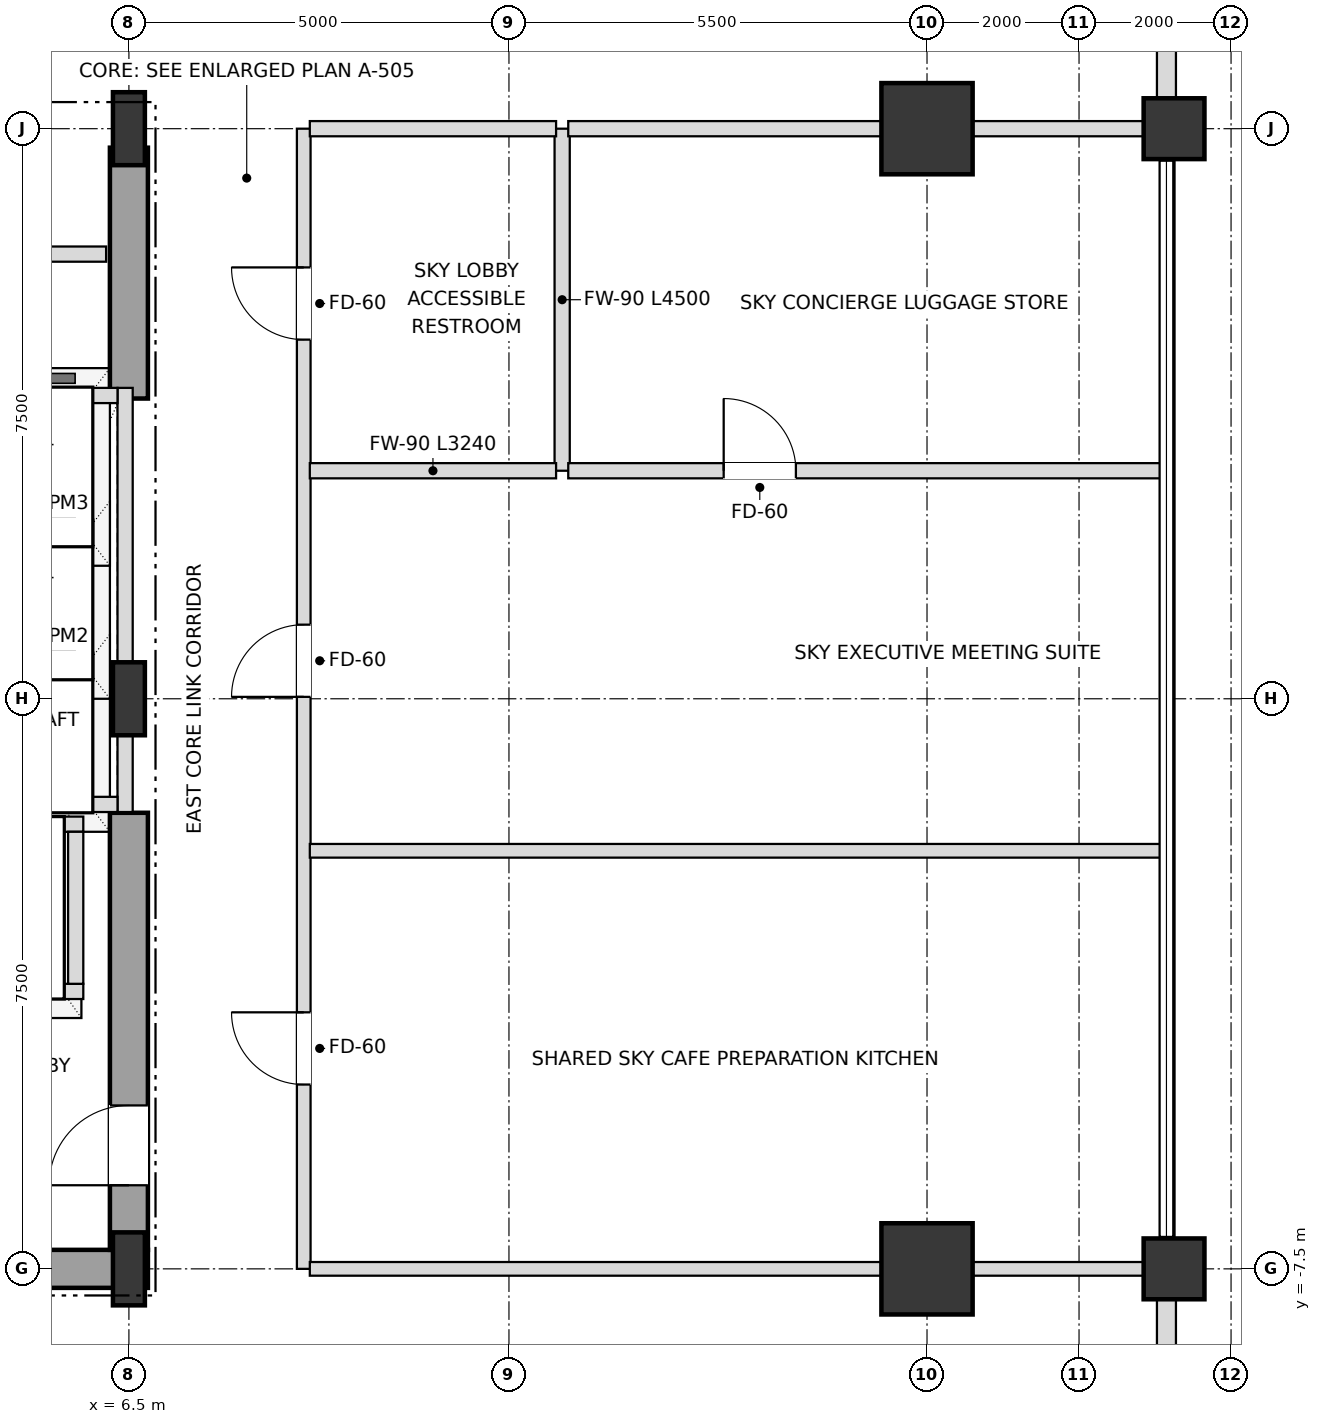
"""IFC4 building model, lengths in metres.
Left out: names, types, materials, properties, quantities, classifications, styles, units other than length and angle.
Written with IfcOpenShell. Run it as: python <this file> out.ifc"""

import sys

from ifc_helpers import new_model, si_unit, direction, frame, frame_2d, origin, origin_2d, place, context, subcontext, project, spatial, rectangle, i_section, extrude, element, fill, save


model = new_model("IFC4")
c1 = context("Model", 3, precision=1e-05, world=origin(), true_north=direction((0.0, 1.0)))
c2 = subcontext(c1, "Body", "Model", "MODEL_VIEW")
j1 = project(units=[si_unit("LENGTHUNIT", "METRE"), si_unit("PLANEANGLEUNIT", "RADIAN")], contexts=[c1])
p1 = place(None, origin())
s1 = spatial("IfcSite", under=j1, at=p1, CompositionType="ELEMENT")
p2 = place(p1, origin())
s2 = spatial("IfcBuilding", under=s1, at=p2, CompositionType="ELEMENT")
p3 = place(p2, frame((0.0, 0.0, 129.6)))
s3 = spatial("IfcBuildingStorey", under=s2, at=p3, CompositionType="ELEMENT", Elevation=129.6)
for number, where, z_axis, x_axis in (
    (1, (6.5, -7.5, 0.0), (0.0, 0.0, 1.0), (1.0, 0.0, 0.0)),
    (2, (6.5, 0.0, 0.0), (0.0, 0.0, 1.0), (1.0, 0.0, 0.0)),
    (3, (6.5, 7.5, 0.0), (0.0, 0.0, 1.0), (1.0, 0.0, 0.0)),
):
    element("IfcColumn", number, at=place(p3, frame(where, z_axis=z_axis, x_axis=x_axis)), inside=s3, PredefinedType="COLUMN", context=c2, shape_type="SweptSolid", body=[
        extrude(i_section(OverallWidth=0.42, OverallDepth=0.96, WebThickness=0.022, FlangeThickness=0.034, at=origin_2d()), origin(), (0.0, 0.0, 1.0), 3.6),
    ])
for number, where, z_axis, x_axis in (
    (4, (17.0, -7.5, 0.0), (0.0, 0.0, 1.0), (1.0, 0.0, 0.0)),
    (5, (17.0, 7.5, 0.0), (0.0, 0.0, 1.0), (1.0, 0.0, 0.0)),
):
    element("IfcColumn", number, at=place(p3, frame(where, z_axis=z_axis, x_axis=x_axis)), inside=s3, PredefinedType="USERDEFINED", context=c2, shape_type="SweptSolid", body=[
        extrude(rectangle(XDim=1.2, YDim=1.2, at=origin_2d()), origin(), (0.0, 0.0, 1.0), 3.6),
    ])
for number, where, z_axis, x_axis in (
    (6, (20.25, -7.5, 0.0), (0.0, 0.0, 1.0), (1.0, 0.0, 0.0)),
    (7, (20.25, 7.5, 0.0), (0.0, 0.0, 1.0), (1.0, 0.0, 0.0)),
):
    element("IfcColumn", number, at=place(p3, frame(where, z_axis=z_axis, x_axis=x_axis)), inside=s3, PredefinedType="COLUMN", context=c2, shape_type="SweptSolid", body=[
        extrude(rectangle(XDim=0.8, YDim=0.8, at=origin_2d()), origin(), (0.0, 0.0, 1.0), 3.6),
    ])
p4 = place(p3, frame((20.15, -12.605, 0.0), z_axis=(0.0, 0.0, 1.0), x_axis=(0.0, 1.0, 0.0)))
e8 = element("IfcWall", 8, at=p4, inside=s3, PredefinedType="SOLIDWALL", context=c2, shape_type="SweptSolid", body=[
    extrude(rectangle(XDim=4.71, YDim=0.25, at=frame_2d((2.355, 0.0))), origin(), (0.0, 0.0, 1.0), 2.736),
])
p5 = place(p4, frame((1.455, 0.0, 0.72)))
e9 = element("IfcOpeningElement", 9, at=p5, cuts=e8, PredefinedType="OPENING", context=c2, shape_type="SweptSolid", body=[
    extrude(rectangle(XDim=1.8, YDim=1.68, at=frame_2d((0.9, 0.84))), frame((0.0, 0.135, 0.0), z_axis=(0.0, -1.0, 0.0), x_axis=(1.0, 0.0, 0.0)), (0.0, 0.0, 1.0), 0.27),
])
p6 = place(p3, frame((20.15, 7.895, 0.0), z_axis=(0.0, 0.0, 1.0), x_axis=(0.0, 1.0, 0.0)))
e10 = element("IfcWall", 10, at=p6, inside=s3, PredefinedType="SOLIDWALL", context=c2, shape_type="SweptSolid", body=[
    extrude(rectangle(XDim=4.71, YDim=0.25, at=frame_2d((2.355, 0.0))), origin(), (0.0, 0.0, 1.0), 2.736),
])
p7 = place(p6, frame((1.455, 0.0, 0.72)))
e11 = element("IfcOpeningElement", 11, at=p7, cuts=e10, PredefinedType="OPENING", context=c2, shape_type="SweptSolid", body=[
    extrude(rectangle(XDim=1.8, YDim=1.68, at=frame_2d((0.9, 0.84))), frame((0.0, 0.135, 0.0), z_axis=(0.0, -1.0, 0.0), x_axis=(1.0, 0.0, 0.0)), (0.0, 0.0, 1.0), 0.27),
])
p8 = place(p3, frame((0.0, -7.5, 0.0), z_axis=(0.0, 0.0, 1.0), x_axis=(1.0, 0.0, 0.0)))
e12 = element("IfcWall", 12, at=p8, inside=s3, PredefinedType="SHEAR", context=c2, shape_type="SweptSolid", body=[
    extrude(rectangle(XDim=6.75, YDim=0.5, at=frame_2d((3.375, 0.0))), origin(), (0.0, 0.0, 1.0), 3.38),
])
p9 = place(p3, frame((6.5, -7.25, 0.0), z_axis=(0.0, 0.0, 1.0), x_axis=(0.0, 1.0, 0.0)))
e13 = element("IfcWall", 13, at=p9, inside=s3, PredefinedType="SHEAR", context=c2, shape_type="SweptSolid", body=[
    extrude(rectangle(XDim=5.75, YDim=0.5, at=frame_2d((2.875, 0.0))), origin(), (0.0, 0.0, 1.0), 3.38),
])
p10 = place(p9, frame((0.85, 0.0, 0.0)))
e14 = element("IfcOpeningElement", 14, at=p10, cuts=e13, PredefinedType="OPENING", context=c2, shape_type="SweptSolid", body=[
    extrude(rectangle(XDim=1.05, YDim=2.15, at=frame_2d((0.525, 1.075))), frame((0.0, 0.26, 0.0), z_axis=(0.0, -1.0, 0.0), x_axis=(1.0, 0.0, 0.0)), (0.0, 0.0, 1.0), 0.52),
])
p11 = place(p3, frame((6.5, 3.95, 0.0), z_axis=(0.0, 0.0, 1.0), x_axis=(0.0, 1.0, 0.0)))
e15 = element("IfcWall", 15, at=p11, inside=s3, PredefinedType="SHEAR", context=c2, shape_type="SweptSolid", body=[
    extrude(rectangle(XDim=3.3, YDim=0.5, at=frame_2d((1.65, 0.0))), origin(), (0.0, 0.0, 1.0), 3.38),
])
p12 = place(p3, frame((6.45, -1.49, 0.0), z_axis=(0.0, 0.0, 1.0), x_axis=(0.0, 1.0, 0.0)))
e16 = element("IfcWall", 16, at=p12, inside=s3, PredefinedType="SOLIDWALL", context=c2, shape_type="SweptSolid", body=[
    extrude(rectangle(XDim=5.58, YDim=0.2, at=frame_2d((2.79, 0.0))), origin(), (0.0, 0.0, 1.0), 2.816),
])
for number, where, z_axis, x_axis in (
    (17, (4.15, -1.39, 0.0), (0.0, 0.0, 1.0), (1.0, 0.0, 0.0)),
    (18, (4.15, 3.99, 0.0), (0.0, 0.0, 1.0), (1.0, 0.0, 0.0)),
):
    element("IfcWall", number, at=place(p3, frame(where, z_axis=z_axis, x_axis=x_axis)), inside=s3, PredefinedType="SOLIDWALL", context=c2, shape_type="SweptSolid", body=[
        extrude(rectangle(XDim=2.2, YDim=0.2, at=frame_2d((1.1, 0.0))), origin(), (0.0, 0.0, 1.0), 3.38),
    ])
p13 = place(p3, frame((1.8, -3.85, 0.0), z_axis=(0.0, 0.0, 1.0), x_axis=(1.0, 0.0, 0.0)))
e19 = element("IfcWall", 19, at=p13, inside=s3, PredefinedType="SOLIDWALL", context=c2, shape_type="SweptSolid", body=[
    extrude(rectangle(XDim=4.1, YDim=0.2, at=frame_2d((2.05, 0.0))), origin(), (0.0, 0.0, 1.0), 3.38),
])
p14 = place(p13, frame((0.45, 0.0, 0.0)))
e20 = element("IfcOpeningElement", 20, at=p14, cuts=e19, PredefinedType="OPENING", context=c2, shape_type="SweptSolid", body=[
    extrude(rectangle(XDim=1.2, YDim=2.2, at=frame_2d((0.6, 1.1))), frame((0.0, 0.11, 0.0), z_axis=(0.0, -1.0, 0.0), x_axis=(1.0, 0.0, 0.0)), (0.0, 0.0, 1.0), 0.22),
])
p15 = place(p13, frame((2.45, 0.0, 0.0)))
e21 = element("IfcOpeningElement", 21, at=p15, cuts=e19, PredefinedType="OPENING", context=c2, shape_type="SweptSolid", body=[
    extrude(rectangle(XDim=1.2, YDim=2.2, at=frame_2d((0.6, 1.1))), frame((0.0, 0.11, 0.0), z_axis=(0.0, -1.0, 0.0), x_axis=(1.0, 0.0, 0.0)), (0.0, 0.0, 1.0), 0.22),
])
p16 = place(p3, frame((1.8, -1.65, 0.0), z_axis=(0.0, 0.0, 1.0), x_axis=(1.0, 0.0, 0.0)))
e22 = element("IfcWall", 22, at=p16, inside=s3, PredefinedType="SOLIDWALL", context=c2, shape_type="SweptSolid", body=[
    extrude(rectangle(XDim=4.1, YDim=0.2, at=frame_2d((2.05, 0.0))), origin(), (0.0, 0.0, 1.0), 3.38),
])
p17 = place(p3, frame((5.8, -3.75, 0.0), z_axis=(0.0, 0.0, 1.0), x_axis=(0.0, 1.0, 0.0)))
e23 = element("IfcWall", 23, at=p17, inside=s3, PredefinedType="SOLIDWALL", context=c2, shape_type="SweptSolid", body=[
    extrude(rectangle(XDim=2.0, YDim=0.2, at=frame_2d((1.0, 0.0))), origin(), (0.0, 0.0, 1.0), 3.38),
])
p18 = place(p3, frame((8.8, -7.5, 0.0), z_axis=(0.0, 0.0, 1.0), x_axis=(0.0, 1.0, 0.0)))
e24 = element("IfcWall", 24, at=p18, inside=s3, PredefinedType="PARTITIONING", context=c2, shape_type="SweptSolid", body=[
    extrude(rectangle(XDim=15.0, YDim=0.18, at=frame_2d((7.5, 0.0))), origin(), (0.0, 0.0, 1.0), 3.38),
])
p19 = place(p18, frame((2.425, 0.0, 0.0)))
e25 = element("IfcOpeningElement", 25, at=p19, cuts=e24, PredefinedType="OPENING", context=c2, shape_type="SweptSolid", body=[
    extrude(rectangle(XDim=0.95, YDim=2.15, at=frame_2d((0.475, 1.075))), frame((0.0, 0.1, 0.0), z_axis=(0.0, -1.0, 0.0), x_axis=(1.0, 0.0, 0.0)), (0.0, 0.0, 1.0), 0.2),
])
p20 = place(p18, frame((7.525, 0.0, 0.0)))
e26 = element("IfcOpeningElement", 26, at=p20, cuts=e24, PredefinedType="OPENING", context=c2, shape_type="SweptSolid", body=[
    extrude(rectangle(XDim=0.95, YDim=2.15, at=frame_2d((0.475, 1.075))), frame((0.0, 0.1, 0.0), z_axis=(0.0, -1.0, 0.0), x_axis=(1.0, 0.0, 0.0)), (0.0, 0.0, 1.0), 0.2),
])
p21 = place(p18, frame((12.225, 0.0, 0.0)))
e27 = element("IfcOpeningElement", 27, at=p21, cuts=e24, PredefinedType="OPENING", context=c2, shape_type="SweptSolid", body=[
    extrude(rectangle(XDim=0.95, YDim=2.15, at=frame_2d((0.475, 1.075))), frame((0.0, 0.1, 0.0), z_axis=(0.0, -1.0, 0.0), x_axis=(1.0, 0.0, 0.0)), (0.0, 0.0, 1.0), 0.2),
])
p22 = place(p3, frame((12.2, 3.0, 0.0), z_axis=(0.0, 0.0, 1.0), x_axis=(0.0, 1.0, 0.0)))
e28 = element("IfcWall", 28, at=p22, inside=s3, PredefinedType="SOLIDWALL", context=c2, shape_type="SweptSolid", body=[
    extrude(rectangle(XDim=4.5, YDim=0.2, at=frame_2d((2.25, 0.0))), origin(), (0.0, 0.0, 1.0), 3.38),
])
p23 = place(p3, frame((8.88, -7.5, 0.0), z_axis=(0.0, 0.0, 1.0), x_axis=(1.0, 0.0, 0.0)))
e29 = element("IfcWall", 29, at=p23, inside=s3, PredefinedType="PARTITIONING", context=c2, shape_type="SweptSolid", body=[
    extrude(rectangle(XDim=11.27, YDim=0.18, at=frame_2d((5.635, 0.0))), origin(), (0.0, 0.0, 1.0), 2.816),
])
p24 = place(p3, frame((8.88, -2.0, 0.0), z_axis=(0.0, 0.0, 1.0), x_axis=(1.0, 0.0, 0.0)))
e30 = element("IfcWall", 30, at=p24, inside=s3, PredefinedType="PARTITIONING", context=c2, shape_type="SweptSolid", body=[
    extrude(rectangle(XDim=11.19, YDim=0.18, at=frame_2d((5.595, 0.0))), origin(), (0.0, 0.0, 1.0), 2.816),
])
p25 = place(p3, frame((8.88, 3.0, 0.0), z_axis=(0.0, 0.0, 1.0), x_axis=(1.0, 0.0, 0.0)))
e31 = element("IfcWall", 31, at=p25, inside=s3, PredefinedType="SOLIDWALL", context=c2, shape_type="SweptSolid", body=[
    extrude(rectangle(XDim=3.24, YDim=0.2, at=frame_2d((1.62, 0.0))), origin(), (0.0, 0.0, 1.0), 3.38),
])
p26 = place(p3, frame((12.28, 3.0, 0.0), z_axis=(0.0, 0.0, 1.0), x_axis=(1.0, 0.0, 0.0)))
e32 = element("IfcWall", 32, at=p26, inside=s3, PredefinedType="SOLIDWALL", context=c2, shape_type="SweptSolid", body=[
    extrude(rectangle(XDim=7.79, YDim=0.2, at=frame_2d((3.895, 0.0))), origin(), (0.0, 0.0, 1.0), 2.816),
])
p27 = place(p26, frame((2.045, 0.0, 0.0)))
e33 = element("IfcOpeningElement", 33, at=p27, cuts=e32, PredefinedType="OPENING", context=c2, shape_type="SweptSolid", body=[
    extrude(rectangle(XDim=0.95, YDim=2.15, at=frame_2d((0.475, 1.075))), frame((0.0, 0.11, 0.0), z_axis=(0.0, -1.0, 0.0), x_axis=(1.0, 0.0, 0.0)), (0.0, 0.0, 1.0), 0.22),
])
p28 = place(p3, frame((4.13, 5.85, 0.0), z_axis=(0.0, 0.0, 1.0), x_axis=(1.0, 0.0, 0.0)))
e34 = element("IfcWall", 34, at=p28, inside=s3, PredefinedType="SOLIDWALL", context=c2, shape_type="SweptSolid", body=[
    extrude(rectangle(XDim=2.07, YDim=0.2, at=frame_2d((1.035, 0.0))), origin(), (0.0, 0.0, 1.0), 3.38),
])
p29 = place(p3, frame((8.88, 7.5, 0.0), z_axis=(0.0, 0.0, 1.0), x_axis=(1.0, 0.0, 0.0)))
e35 = element("IfcWall", 35, at=p29, inside=s3, PredefinedType="SOLIDWALL", context=c2, shape_type="SweptSolid", body=[
    extrude(rectangle(XDim=3.24, YDim=0.2, at=frame_2d((1.62, 0.0))), origin(), (0.0, 0.0, 1.0), 2.816),
])
p30 = place(p3, frame((12.28, 7.5, 0.0), z_axis=(0.0, 0.0, 1.0), x_axis=(1.0, 0.0, 0.0)))
e36 = element("IfcWall", 36, at=p30, inside=s3, PredefinedType="SOLIDWALL", context=c2, shape_type="SweptSolid", body=[
    extrude(rectangle(XDim=7.87, YDim=0.2, at=frame_2d((3.935, 0.0))), origin(), (0.0, 0.0, 1.0), 2.816),
])
p31 = place(p10, origin())
e37 = element("IfcDoor", 37, at=p31, inside=s3, OperationType="SINGLE_SWING_LEFT", PredefinedType="DOOR", context=c2, shape_type="SweptSolid", body=[
    extrude(rectangle(XDim=1.05, YDim=2.15, at=frame_2d((0.525, 1.075))), frame((0.0, 0.025, 0.0), z_axis=(0.0, -1.0, 0.0), x_axis=(1.0, 0.0, 0.0)), (0.0, 0.0, 1.0), 0.05),
])
fill(e14, e37)
p32 = place(p19, origin())
e38 = element("IfcDoor", 38, at=p32, inside=s3, OperationType="SINGLE_SWING_RIGHT", PredefinedType="DOOR", context=c2, shape_type="SweptSolid", body=[
    extrude(rectangle(XDim=0.95, YDim=2.15, at=frame_2d((0.475, 1.075))), frame((0.0, 0.025, 0.0), z_axis=(0.0, -1.0, 0.0), x_axis=(1.0, 0.0, 0.0)), (0.0, 0.0, 1.0), 0.05),
])
fill(e25, e38)
p33 = place(p20, origin())
e39 = element("IfcDoor", 39, at=p33, inside=s3, OperationType="SINGLE_SWING_LEFT", PredefinedType="DOOR", context=c2, shape_type="SweptSolid", body=[
    extrude(rectangle(XDim=0.95, YDim=2.15, at=frame_2d((0.475, 1.075))), frame((0.0, 0.025, 0.0), z_axis=(0.0, -1.0, 0.0), x_axis=(1.0, 0.0, 0.0)), (0.0, 0.0, 1.0), 0.05),
])
fill(e26, e39)
p34 = place(p21, origin())
e40 = element("IfcDoor", 40, at=p34, inside=s3, OperationType="SINGLE_SWING_RIGHT", PredefinedType="DOOR", context=c2, shape_type="SweptSolid", body=[
    extrude(rectangle(XDim=0.95, YDim=2.15, at=frame_2d((0.475, 1.075))), frame((0.0, 0.025, 0.0), z_axis=(0.0, -1.0, 0.0), x_axis=(1.0, 0.0, 0.0)), (0.0, 0.0, 1.0), 0.05),
])
fill(e27, e40)
p35 = place(p27, origin())
e41 = element("IfcDoor", 41, at=p35, inside=s3, OperationType="SINGLE_SWING_LEFT", PredefinedType="DOOR", context=c2, shape_type="SweptSolid", body=[
    extrude(rectangle(XDim=0.95, YDim=2.15, at=frame_2d((0.475, 1.075))), frame((0.0, 0.025, 0.0), z_axis=(0.0, -1.0, 0.0), x_axis=(1.0, 0.0, 0.0)), (0.0, 0.0, 1.0), 0.05),
])
fill(e33, e41)
save(model, sys.argv[1])
